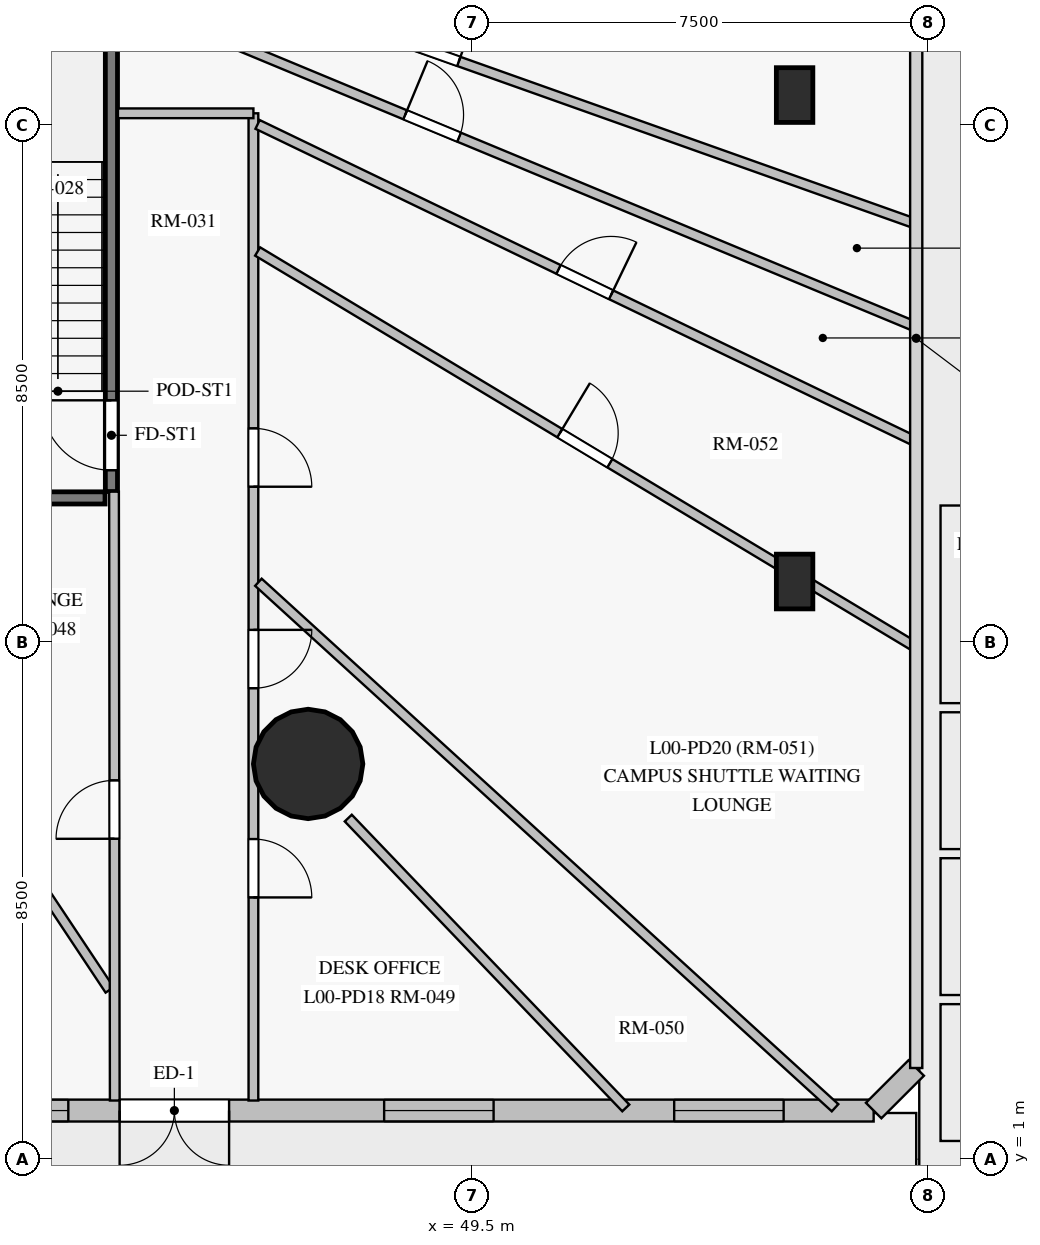
"""IFC4 building model, lengths in metres.
Left out: names, types, materials, properties, quantities, classifications, styles, units other than length and angle.
Written with IfcOpenShell. Run it as: python <this file> out.ifc"""

import sys

from ifc_helpers import new_model, si_unit, direction, frame, frame_2d, origin, origin_with_axes, origin_2d, place, context, subcontext, project, spatial, rectangle, circle, extrude, source, transform, mapped, element, fill, save


model = new_model("IFC4")
c1 = context("Model", 3, precision=1e-05, world=origin(), true_north=direction((0.0, 1.0)))
c2 = subcontext(c1, "Body", "Model", "MODEL_VIEW")
j1 = project(units=[si_unit("LENGTHUNIT", "METRE"), si_unit("PLANEANGLEUNIT", "RADIAN")], contexts=[c1])
p1 = place(None, origin())
s1 = spatial("IfcSite", under=j1, at=p1, CompositionType="ELEMENT")
p2 = place(p1, origin())
s2 = spatial("IfcBuilding", under=s1, at=p2, CompositionType="ELEMENT")
p3 = place(p2, origin())
s3 = spatial("IfcBuildingStorey", under=s2, at=p3, CompositionType="ELEMENT", Elevation=0.0)
m1 = source(origin_with_axes(), c2, "Body", "SweptSolid", [
    extrude(circle(Radius=0.9, at=origin_2d()), origin(), (0.0, 0.0, 1.0), 4.5),
])
p4 = place(p3, frame((46.8, 7.5, 0.0), z_axis=(0.0, 0.0, 1.0), x_axis=(1.0, 0.0, 0.0)))
e1 = element("IfcColumn", 1, at=p4, inside=s3, PredefinedType="COLUMN", context=c2, shape_type="MappedRepresentation", body=[
    mapped(m1, transform((0.0, 0.0, 0.0), scale=1.0)),
])
m2 = source(origin_with_axes(), c2, "Body", "SweptSolid", [
    extrude(rectangle(XDim=0.6, YDim=0.9, at=origin_2d()), origin(), (0.0, 0.0, 1.0), 4.5),
])
for number, where, z_axis, x_axis in (
    (2, (54.8, 10.5, 0.0), (0.0, 0.0, 1.0), (1.0, 0.0, 0.0)),
    (3, (54.8, 18.5, 0.0), (0.0, 0.0, 1.0), (1.0, 0.0, 0.0)),
):
    element("IfcColumn", number, at=place(p3, frame(where, z_axis=z_axis, x_axis=x_axis)), inside=s3, PredefinedType="PILASTER", context=c2, shape_type="MappedRepresentation", body=[
        mapped(m2, transform((0.0, 0.0, 0.0), scale=1.0)),
    ])
p5 = place(p3, frame((56.1, 1.8, 0.0), z_axis=(0.0, 0.0, 1.0), x_axis=(-1.0, 0.0, 0.0)))
e4 = element("IfcWall", 4, at=p5, inside=s3, PredefinedType="SOLIDWALL", context=c2, shape_type="SweptSolid", body=[
    extrude(rectangle(XDim=54.6, YDim=0.36, at=frame_2d((27.3, 0.0))), origin(), (0.0, 0.0, 1.0), 4.2),
])
p6 = place(p5, frame((51.547, 0.0, 0.85)))
e5 = element("IfcOpeningElement", 5, at=p6, cuts=e4, PredefinedType="OPENING", context=c2, shape_type="SweptSolid", body=[
    extrude(rectangle(XDim=1.8, YDim=2.2, at=frame_2d((0.9, 1.1))), frame((0.0, 0.19, 0.0), z_axis=(0.0, -1.0, 0.0), x_axis=(1.0, 0.0, 0.0)), (0.0, 0.0, 1.0), 0.38),
])
p7 = place(p5, frame((47.014, 0.0, 0.85)))
e6 = element("IfcOpeningElement", 6, at=p7, cuts=e4, PredefinedType="OPENING", context=c2, shape_type="SweptSolid", body=[
    extrude(rectangle(XDim=1.8, YDim=2.2, at=frame_2d((0.9, 1.1))), frame((0.0, 0.19, 0.0), z_axis=(0.0, -1.0, 0.0), x_axis=(1.0, 0.0, 0.0)), (0.0, 0.0, 1.0), 0.38),
])
p8 = place(p5, frame((42.49, 0.0, 0.85)))
e7 = element("IfcOpeningElement", 7, at=p8, cuts=e4, PredefinedType="OPENING", context=c2, shape_type="SweptSolid", body=[
    extrude(rectangle(XDim=1.8, YDim=2.2, at=frame_2d((0.9, 1.1))), frame((0.0, 0.19, 0.0), z_axis=(0.0, -1.0, 0.0), x_axis=(1.0, 0.0, 0.0)), (0.0, 0.0, 1.0), 0.38),
])
p9 = place(p5, frame((37.288, 0.0, 0.85)))
e8 = element("IfcOpeningElement", 8, at=p9, cuts=e4, PredefinedType="OPENING", context=c2, shape_type="SweptSolid", body=[
    extrude(rectangle(XDim=1.8, YDim=2.2, at=frame_2d((0.9, 1.1))), frame((0.0, 0.19, 0.0), z_axis=(0.0, -1.0, 0.0), x_axis=(1.0, 0.0, 0.0)), (0.0, 0.0, 1.0), 0.38),
])
p10 = place(p5, frame((25.176, 0.0, 0.85)))
e9 = element("IfcOpeningElement", 9, at=p10, cuts=e4, PredefinedType="OPENING", context=c2, shape_type="SweptSolid", body=[
    extrude(rectangle(XDim=1.8, YDim=2.2, at=frame_2d((0.9, 1.1))), frame((0.0, 0.19, 0.0), z_axis=(0.0, -1.0, 0.0), x_axis=(1.0, 0.0, 0.0)), (0.0, 0.0, 1.0), 0.38),
])
p11 = place(p5, frame((17.162, 0.0, 0.85)))
e10 = element("IfcOpeningElement", 10, at=p11, cuts=e4, PredefinedType="OPENING", context=c2, shape_type="SweptSolid", body=[
    extrude(rectangle(XDim=1.8, YDim=2.2, at=frame_2d((0.9, 1.1))), frame((0.0, 0.19, 0.0), z_axis=(0.0, -1.0, 0.0), x_axis=(1.0, 0.0, 0.0)), (0.0, 0.0, 1.0), 0.38),
])
p12 = place(p5, frame((13.244, 0.0, 0.85)))
e11 = element("IfcOpeningElement", 11, at=p12, cuts=e4, PredefinedType="OPENING", context=c2, shape_type="SweptSolid", body=[
    extrude(rectangle(XDim=1.8, YDim=2.2, at=frame_2d((0.9, 1.1))), frame((0.0, 0.19, 0.0), z_axis=(0.0, -1.0, 0.0), x_axis=(1.0, 0.0, 0.0)), (0.0, 0.0, 1.0), 0.38),
])
p13 = place(p5, frame((6.25, 0.0, 0.85)))
e12 = element("IfcOpeningElement", 12, at=p13, cuts=e4, PredefinedType="OPENING", context=c2, shape_type="SweptSolid", body=[
    extrude(rectangle(XDim=1.8, YDim=2.2, at=frame_2d((0.9, 1.1))), frame((0.0, 0.19, 0.0), z_axis=(0.0, -1.0, 0.0), x_axis=(1.0, 0.0, 0.0)), (0.0, 0.0, 1.0), 0.38),
])
p14 = place(p5, frame((1.48, 0.0, 0.85)))
e13 = element("IfcOpeningElement", 13, at=p14, cuts=e4, PredefinedType="OPENING", context=c2, shape_type="SweptSolid", body=[
    extrude(rectangle(XDim=1.8, YDim=2.2, at=frame_2d((0.9, 1.1))), frame((0.0, 0.19, 0.0), z_axis=(0.0, -1.0, 0.0), x_axis=(1.0, 0.0, 0.0)), (0.0, 0.0, 1.0), 0.38),
])
p15 = place(p5, frame((33.2, 0.0, 0.0)))
e14 = element("IfcOpeningElement", 14, at=p15, cuts=e4, PredefinedType="OPENING", context=c2, shape_type="SweptSolid", body=[
    extrude(rectangle(XDim=1.8, YDim=2.3, at=frame_2d((0.9, 1.15))), frame((0.0, 0.19, 0.0), z_axis=(0.0, -1.0, 0.0), x_axis=(1.0, 0.0, 0.0)), (0.0, 0.0, 1.0), 0.38),
])
p16 = place(p5, frame((30.6, 0.0, 0.0)))
e15 = element("IfcOpeningElement", 15, at=p16, cuts=e4, PredefinedType="OPENING", context=c2, shape_type="SweptSolid", body=[
    extrude(rectangle(XDim=1.8, YDim=2.3, at=frame_2d((0.9, 1.15))), frame((0.0, 0.19, 0.0), z_axis=(0.0, -1.0, 0.0), x_axis=(1.0, 0.0, 0.0)), (0.0, 0.0, 1.0), 0.38),
])
p17 = place(p5, frame((10.6, 0.0, 0.0)))
e16 = element("IfcOpeningElement", 16, at=p17, cuts=e4, PredefinedType="OPENING", context=c2, shape_type="SweptSolid", body=[
    extrude(rectangle(XDim=1.8, YDim=2.3, at=frame_2d((0.9, 1.15))), frame((0.0, 0.19, 0.0), z_axis=(0.0, -1.0, 0.0), x_axis=(1.0, 0.0, 0.0)), (0.0, 0.0, 1.0), 0.38),
])
p18 = place(p3, frame((56.1, 1.8, 0.0), z_axis=(0.0, 0.0, 1.0), x_axis=(0.707106781187, 0.707106781187, 0.0)))
e17 = element("IfcWall", 17, at=p18, inside=s3, PredefinedType="SOLIDWALL", context=c2, shape_type="SweptSolid", body=[
    extrude(rectangle(XDim=0.99, YDim=0.36, at=frame_2d((0.495, 0.0))), origin(), (0.0, 0.0, 1.0), 4.2),
])
p19 = place(p3, frame((43.565, 11.98, 0.0), z_axis=(0.0, 0.0, 1.0), x_axis=(0.0, 1.0, 0.0)))
e18 = element("IfcWall", 18, at=p19, inside=s3, PredefinedType="SHEAR", context=c2, shape_type="SweptSolid", body=[
    extrude(rectangle(XDim=7.35, YDim=0.2, at=frame_2d((3.675, 0.0))), origin(), (0.0, 0.0, 1.0), 4.2),
])
p20 = place(p19, frame((0.35, 0.0, 0.0)))
e19 = element("IfcOpeningElement", 19, at=p20, cuts=e18, PredefinedType="OPENING", context=c2, shape_type="SweptSolid", body=[
    extrude(rectangle(XDim=1.15, YDim=2.15, at=frame_2d((0.575, 1.075))), frame((0.0, 0.11, 0.0), z_axis=(0.0, -1.0, 0.0), x_axis=(1.0, 0.0, 0.0)), (0.0, 0.0, 1.0), 0.22),
])
p21 = place(p3, frame((40.2, 11.875, 0.0), z_axis=(0.0, 0.0, 1.0), x_axis=(1.0, 0.0, 0.0)))
e20 = element("IfcWall", 20, at=p21, inside=s3, PredefinedType="SHEAR", context=c2, shape_type="SweptSolid", body=[
    extrude(rectangle(XDim=3.26, YDim=0.2, at=frame_2d((1.63, 0.0))), origin(), (0.0, 0.0, 1.0), 4.2),
])
p22 = place(p3, frame((40.932, 21.274, 0.0), z_axis=(0.0, 0.0, 1.0), x_axis=(0.923573591062, -0.383421206889, 0.0)))
e21 = element("IfcWall", 21, at=p22, inside=s3, PredefinedType="PARTITIONING", context=c2, shape_type="SweptSolid", body=[
    extrude(rectangle(XDim=17.149, YDim=0.16, at=frame_2d((8.574, 0.0))), origin(), (0.0, 0.0, 1.0), 4.2),
])
p23 = place(p22, frame((8.082, 0.0, 0.0)))
e22 = element("IfcOpeningElement", 22, at=p23, cuts=e21, PredefinedType="OPENING", context=c2, shape_type="SweptSolid", body=[
    extrude(rectangle(XDim=0.96, YDim=2.15, at=frame_2d((0.48, 1.075))), frame((0.0, 0.09, 0.0), z_axis=(0.0, -1.0, 0.0), x_axis=(1.0, 0.0, 0.0)), (0.0, 0.0, 1.0), 0.18),
])
p24 = place(p3, frame((40.918, 22.024, 0.0), z_axis=(0.0, 0.0, 1.0), x_axis=(0.942274220907, -0.334842190613, 0.0)))
e23 = element("IfcWall", 23, at=p24, inside=s3, PredefinedType="PARTITIONING", context=c2, shape_type="SweptSolid", body=[
    extrude(rectangle(XDim=16.824, YDim=0.16, at=frame_2d((8.412, 0.0))), origin(), (0.0, 0.0, 1.0), 4.2),
])
p25 = place(p24, frame((7.912, 0.0, 0.0)))
e24 = element("IfcOpeningElement", 24, at=p25, cuts=e23, PredefinedType="OPENING", context=c2, shape_type="SweptSolid", body=[
    extrude(rectangle(XDim=0.96, YDim=2.15, at=frame_2d((0.48, 1.075))), frame((0.0, 0.09, 0.0), z_axis=(0.0, -1.0, 0.0), x_axis=(1.0, 0.0, 0.0)), (0.0, 0.0, 1.0), 0.18),
])
p26 = place(p3, frame((45.9, 18.2, 0.0), z_axis=(0.0, 0.0, 1.0), x_axis=(0.0, -1.0, 0.0)))
e25 = element("IfcWall", 25, at=p26, inside=s3, PredefinedType="PARTITIONING", context=c2, shape_type="SweptSolid", body=[
    extrude(rectangle(XDim=16.235, YDim=0.16, at=frame_2d((8.117, 0.0))), origin(), (0.0, 0.0, 1.0), 4.2),
])
p27 = place(p26, frame((11.935, 0.0, 0.0)))
e26 = element("IfcOpeningElement", 26, at=p27, cuts=e25, PredefinedType="OPENING", context=c2, shape_type="SweptSolid", body=[
    extrude(rectangle(XDim=0.96, YDim=2.15, at=frame_2d((0.48, 1.075))), frame((0.0, 0.09, 0.0), z_axis=(0.0, -1.0, 0.0), x_axis=(1.0, 0.0, 0.0)), (0.0, 0.0, 1.0), 0.18),
])
p28 = place(p26, frame((8.495, 0.0, 0.0)))
e27 = element("IfcOpeningElement", 27, at=p28, cuts=e25, PredefinedType="OPENING", context=c2, shape_type="SweptSolid", body=[
    extrude(rectangle(XDim=0.96, YDim=2.15, at=frame_2d((0.48, 1.075))), frame((0.0, 0.09, 0.0), z_axis=(0.0, -1.0, 0.0), x_axis=(1.0, 0.0, 0.0)), (0.0, 0.0, 1.0), 0.18),
])
p29 = place(p26, frame((5.181, 0.0, 0.0)))
e28 = element("IfcOpeningElement", 28, at=p29, cuts=e25, PredefinedType="OPENING", context=c2, shape_type="SweptSolid", body=[
    extrude(rectangle(XDim=0.96, YDim=2.15, at=frame_2d((0.48, 1.075))), frame((0.0, 0.09, 0.0), z_axis=(0.0, -1.0, 0.0), x_axis=(1.0, 0.0, 0.0)), (0.0, 0.0, 1.0), 0.18),
])
p30 = place(p3, frame((36.156, 14.881, 0.0), z_axis=(0.0, 0.0, 1.0), x_axis=(0.553761322164, -0.832675445822, 0.0)))
e29 = element("IfcWall", 29, at=p30, inside=s3, PredefinedType="PARTITIONING", context=c2, shape_type="SweptSolid", body=[
    extrude(rectangle(XDim=13.327, YDim=0.16, at=frame_2d((6.664, 0.0))), origin(), (0.0, 0.0, 1.0), 4.2),
])
p31 = place(p3, frame((45.982, 10.488, 0.0), z_axis=(0.0, 0.0, 1.0), x_axis=(0.73914139053, -0.673550298646, 0.0)))
e30 = element("IfcWall", 30, at=p31, inside=s3, PredefinedType="PARTITIONING", context=c2, shape_type="SweptSolid", body=[
    extrude(rectangle(XDim=12.83, YDim=0.16, at=frame_2d((6.415, 0.0))), origin(), (0.0, 0.0, 1.0), 4.2),
])
p32 = place(p3, frame((45.969, 15.927, 0.0), z_axis=(0.0, 0.0, 1.0), x_axis=(0.857034319892, -0.515259327453, 0.0)))
e31 = element("IfcWall", 31, at=p32, inside=s3, PredefinedType="PARTITIONING", context=c2, shape_type="SweptSolid", body=[
    extrude(rectangle(XDim=12.598, YDim=0.16, at=frame_2d((6.299, 0.0))), origin(), (0.0, 0.0, 1.0), 4.2),
])
p33 = place(p32, frame((5.799, 0.0, 0.0)))
e32 = element("IfcOpeningElement", 32, at=p33, cuts=e31, PredefinedType="OPENING", context=c2, shape_type="SweptSolid", body=[
    extrude(rectangle(XDim=0.96, YDim=2.15, at=frame_2d((0.48, 1.075))), frame((0.0, 0.09, 0.0), z_axis=(0.0, -1.0, 0.0), x_axis=(1.0, 0.0, 0.0)), (0.0, 0.0, 1.0), 0.18),
])
p34 = place(p3, frame((45.969, 18.017, 0.0), z_axis=(0.0, 0.0, 1.0), x_axis=(0.900884595161, -0.434058689813, 0.0)))
e33 = element("IfcWall", 33, at=p34, inside=s3, PredefinedType="PARTITIONING", context=c2, shape_type="SweptSolid", body=[
    extrude(rectangle(XDim=11.988, YDim=0.16, at=frame_2d((5.994, 0.0))), origin(), (0.0, 0.0, 1.0), 4.2),
])
p35 = place(p34, frame((5.494, 0.0, 0.0)))
e34 = element("IfcOpeningElement", 34, at=p35, cuts=e33, PredefinedType="OPENING", context=c2, shape_type="SweptSolid", body=[
    extrude(rectangle(XDim=0.96, YDim=2.15, at=frame_2d((0.48, 1.075))), frame((0.0, 0.09, 0.0), z_axis=(0.0, -1.0, 0.0), x_axis=(1.0, 0.0, 0.0)), (0.0, 0.0, 1.0), 0.18),
])
p36 = place(p3, frame((43.62, 1.965, 0.0), z_axis=(0.0, 0.0, 1.0), x_axis=(-0.001219154463, 0.999999256831, 0.0)))
e35 = element("IfcWall", 35, at=p36, inside=s3, PredefinedType="PARTITIONING", context=c2, shape_type="SweptSolid", body=[
    extrude(rectangle(XDim=10.013, YDim=0.16, at=frame_2d((5.006, 0.0))), origin(), (0.0, 0.0, 1.0), 4.2),
])
p37 = place(p36, frame((4.305, 0.0, 0.0)))
e36 = element("IfcOpeningElement", 36, at=p37, cuts=e35, PredefinedType="OPENING", context=c2, shape_type="SweptSolid", body=[
    extrude(rectangle(XDim=0.96, YDim=2.15, at=frame_2d((0.48, 1.075))), frame((0.0, 0.09, 0.0), z_axis=(0.0, -1.0, 0.0), x_axis=(1.0, 0.0, 0.0)), (0.0, 0.0, 1.0), 0.18),
])
p38 = place(p3, frame((47.46, 6.61, 0.0), z_axis=(0.0, 0.0, 1.0), x_axis=(0.69155014519, -0.722328454851, 0.0)))
e37 = element("IfcWall", 37, at=p38, inside=s3, PredefinedType="PARTITIONING", context=c2, shape_type="SweptSolid", body=[
    extrude(rectangle(XDim=6.6, YDim=0.16, at=frame_2d((3.3, 0.0))), origin(), (0.0, 0.0, 1.0), 4.2),
])
p39 = place(p3, frame((43.672, 18.2, 0.0), z_axis=(0.0, 0.0, 1.0), x_axis=(1.0, 0.0, 0.0)))
e38 = element("IfcWall", 38, at=p39, inside=s3, PredefinedType="PARTITIONING", context=c2, shape_type="SweptSolid", body=[
    extrude(rectangle(XDim=2.228, YDim=0.16, at=frame_2d((1.114, 0.0))), origin(), (0.0, 0.0, 1.0), 4.2),
])
m3 = source(origin_with_axes(), c2, "Body", "SweptSolid", [
    extrude(rectangle(XDim=1.8, YDim=2.2, at=frame_2d((0.9, 1.1))), frame((0.0, 0.03, 0.0), z_axis=(0.0, -1.0, 0.0), x_axis=(1.0, 0.0, 0.0)), (0.0, 0.0, 1.0), 0.06),
])
p40 = place(p12, origin())
e39 = element("IfcWindow", 39, at=p40, inside=s3, PartitioningType="SINGLE_PANEL", PredefinedType="WINDOW", context=c2, shape_type="MappedRepresentation", body=[
    mapped(m3, transform((0.0, 0.0, 0.0), scale=1.0)),
])
fill(e11, e39)
p41 = place(p13, origin())
e40 = element("IfcWindow", 40, at=p41, inside=s3, PartitioningType="SINGLE_PANEL", PredefinedType="WINDOW", context=c2, shape_type="MappedRepresentation", body=[
    mapped(m3, transform((0.0, 0.0, 0.0), scale=1.0)),
])
fill(e12, e40)
p42 = place(p14, origin())
e41 = element("IfcWindow", 41, at=p42, inside=s3, PartitioningType="SINGLE_PANEL", PredefinedType="WINDOW", context=c2, shape_type="MappedRepresentation", body=[
    mapped(m3, transform((0.0, 0.0, 0.0), scale=1.0)),
])
fill(e13, e41)
m4 = source(origin_with_axes(), c2, "Body", "SweptSolid", [
    extrude(rectangle(XDim=1.8, YDim=2.3, at=frame_2d((0.9, 1.15))), frame((0.0, 0.025, 0.0), z_axis=(0.0, -1.0, 0.0), x_axis=(1.0, 0.0, 0.0)), (0.0, 0.0, 1.0), 0.05),
])
p43 = place(p17, origin())
e42 = element("IfcDoor", 42, at=p43, inside=s3, OperationType="DOUBLE_DOOR_SINGLE_SWING", PredefinedType="DOOR", context=c2, shape_type="MappedRepresentation", body=[
    mapped(m4, transform((0.0, 0.0, 0.0), scale=1.0)),
])
fill(e16, e42)
m5 = source(origin_with_axes(), c2, "Body", "SweptSolid", [
    extrude(rectangle(XDim=1.15, YDim=2.15, at=frame_2d((0.575, 1.075))), frame((0.0, 0.025, 0.0), z_axis=(0.0, -1.0, 0.0), x_axis=(1.0, 0.0, 0.0)), (0.0, 0.0, 1.0), 0.05),
])
p44 = place(p20, origin())
e43 = element("IfcDoor", 43, at=p44, inside=s3, OperationType="SINGLE_SWING_RIGHT", PredefinedType="DOOR", context=c2, shape_type="MappedRepresentation", body=[
    mapped(m5, transform((0.0, 0.0, 0.0), scale=1.0)),
])
fill(e19, e43)
m6 = source(origin_with_axes(), c2, "Body", "SweptSolid", [
    extrude(rectangle(XDim=0.96, YDim=2.15, at=frame_2d((0.48, 1.075))), frame((0.0, 0.025, 0.0), z_axis=(0.0, -1.0, 0.0), x_axis=(1.0, 0.0, 0.0)), (0.0, 0.0, 1.0), 0.05),
])
p45 = place(p37, origin())
e44 = element("IfcDoor", 44, at=p45, inside=s3, OperationType="SINGLE_SWING_LEFT", PredefinedType="DOOR", context=c2, shape_type="MappedRepresentation", body=[
    mapped(m6, transform((0.0, 0.0, 0.0), scale=1.0)),
])
fill(e36, e44)
p46 = place(p27, origin())
e45 = element("IfcDoor", 45, at=p46, inside=s3, OperationType="SINGLE_SWING_RIGHT", PredefinedType="DOOR", context=c2, shape_type="MappedRepresentation", body=[
    mapped(m6, transform((0.0, 0.0, 0.0), scale=1.0)),
])
fill(e26, e45)
p47 = place(p28, origin())
e46 = element("IfcDoor", 46, at=p47, inside=s3, OperationType="SINGLE_SWING_LEFT", PredefinedType="DOOR", context=c2, shape_type="MappedRepresentation", body=[
    mapped(m6, transform((0.0, 0.0, 0.0), scale=1.0)),
])
fill(e27, e46)
p48 = place(p29, origin())
e47 = element("IfcDoor", 47, at=p48, inside=s3, OperationType="SINGLE_SWING_RIGHT", PredefinedType="DOOR", context=c2, shape_type="MappedRepresentation", body=[
    mapped(m6, transform((0.0, 0.0, 0.0), scale=1.0)),
])
fill(e28, e47)
p49 = place(p33, origin())
e48 = element("IfcDoor", 48, at=p49, inside=s3, OperationType="SINGLE_SWING_LEFT", PredefinedType="DOOR", context=c2, shape_type="MappedRepresentation", body=[
    mapped(m6, transform((0.0, 0.0, 0.0), scale=1.0)),
])
fill(e32, e48)
p50 = place(p35, origin())
e49 = element("IfcDoor", 49, at=p50, inside=s3, OperationType="SINGLE_SWING_RIGHT", PredefinedType="DOOR", context=c2, shape_type="MappedRepresentation", body=[
    mapped(m6, transform((0.0, 0.0, 0.0), scale=1.0)),
])
fill(e34, e49)
p51 = place(p23, origin())
e50 = element("IfcDoor", 50, at=p51, inside=s3, OperationType="SINGLE_SWING_LEFT", PredefinedType="DOOR", context=c2, shape_type="MappedRepresentation", body=[
    mapped(m6, transform((0.0, 0.0, 0.0), scale=1.0)),
])
fill(e22, e50)
p52 = place(p25, origin())
e51 = element("IfcDoor", 51, at=p52, inside=s3, OperationType="SINGLE_SWING_RIGHT", PredefinedType="DOOR", context=c2, shape_type="MappedRepresentation", body=[
    mapped(m6, transform((0.0, 0.0, 0.0), scale=1.0)),
])
fill(e24, e51)
save(model, sys.argv[1])
